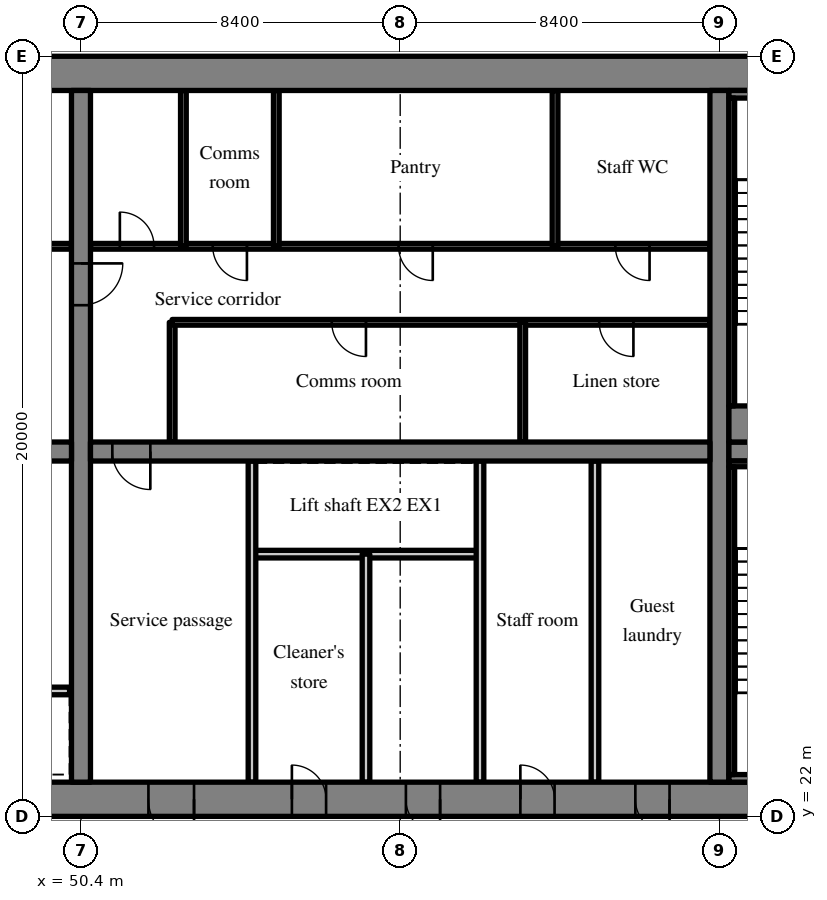
"""IFC4 building model, lengths in metres.
Left out: names, types, materials, properties, quantities, classifications, styles, units other than length and angle.
Written with IfcOpenShell. Run it as: python <this file> out.ifc"""

import sys

from ifc_helpers import new_model, si_unit, direction, frame, frame_2d, origin, place, context, subcontext, project, spatial, rectangle, extrude, source, transform, mapped, element, fill, save


model = new_model("IFC4")
c1 = context("Model", 3, precision=1e-05, world=origin(), true_north=direction((0.0, 1.0)))
c2 = subcontext(c1, "Body", "Model", "MODEL_VIEW")
j1 = project(units=[si_unit("LENGTHUNIT", "METRE"), si_unit("PLANEANGLEUNIT", "RADIAN")], contexts=[c1])
p1 = place(None, origin())
s1 = spatial("IfcSite", under=j1, at=p1, CompositionType="ELEMENT")
p2 = place(p1, origin())
s2 = spatial("IfcBuilding", under=s1, at=p2, CompositionType="ELEMENT")
p3 = place(p2, frame((0.0, 0.0, 118.0)))
s3 = spatial("IfcBuildingStorey", under=s2, at=p3, CompositionType="ELEMENT", Elevation=118.0)
m1 = source(origin(), c2, "Body", "SweptSolid", [
    extrude(rectangle(XDim=50.4, YDim=0.9, at=frame_2d((25.2, 0.0))), origin(), (0.0, 0.0, 1.0), 3.52),
])
p4 = place(p3, frame((25.2, 22.45, 0.0), z_axis=(0.0, 0.0, 1.0), x_axis=(1.0, 0.0, 0.0)))
e1 = element("IfcWall", 1, at=p4, inside=s3, PredefinedType="SHEAR", context=c2, shape_type="MappedRepresentation", body=[
    mapped(m1, transform((0.0, 0.0, 0.0), scale=1.0)),
])
m2 = source(origin(), c2, "Body", "SweptSolid", [
    extrude(rectangle(XDim=1.8, YDim=2.1, at=frame_2d((0.9, 1.05))), frame((0.0, 0.46, 0.0), z_axis=(0.0, -1.0, 0.0), x_axis=(1.0, 0.0, 0.0)), (0.0, 0.0, 1.0), 0.92),
])
p5 = place(p4, frame((15.9, 0.0, 0.0)))
e2 = element("IfcOpeningElement", 2, at=p5, cuts=e1, PredefinedType="OPENING", context=c2, shape_type="MappedRepresentation", body=[
    mapped(m2, transform((0.0, 0.0, 0.0), scale=1.0)),
])
m3 = source(origin(), c2, "Body", "SweptSolid", [
    extrude(rectangle(XDim=1.2, YDim=2.1, at=frame_2d((0.6, 1.05))), frame((0.0, 0.46, 0.0), z_axis=(0.0, -1.0, 0.0), x_axis=(1.0, 0.0, 0.0)), (0.0, 0.0, 1.0), 0.92),
])
p6 = place(p4, frame((26.975, 0.0, 0.0)))
e3 = element("IfcOpeningElement", 3, at=p6, cuts=e1, PredefinedType="OPENING", context=c2, shape_type="MappedRepresentation", body=[
    mapped(m3, transform((0.0, 0.0, 0.0), scale=1.0)),
])
m4 = source(origin(), c2, "Body", "SweptSolid", [
    extrude(rectangle(XDim=0.9, YDim=2.1, at=frame_2d((0.45, 1.05))), frame((0.0, 0.46, 0.0), z_axis=(0.0, -1.0, 0.0), x_axis=(1.0, 0.0, 0.0)), (0.0, 0.0, 1.0), 0.92),
])
p7 = place(p4, frame((33.75, 0.0, 0.0)))
e4 = element("IfcOpeningElement", 4, at=p7, cuts=e1, PredefinedType="OPENING", context=c2, shape_type="MappedRepresentation", body=[
    mapped(m4, transform((0.0, 0.0, 0.0), scale=1.0)),
])
p8 = place(p4, frame((30.75, 0.0, 0.0)))
e5 = element("IfcOpeningElement", 5, at=p8, cuts=e1, PredefinedType="OPENING", context=c2, shape_type="MappedRepresentation", body=[
    mapped(m4, transform((0.0, 0.0, 0.0), scale=1.0)),
])
p9 = place(p4, frame((39.788, 0.0, 0.0)))
e6 = element("IfcOpeningElement", 6, at=p9, cuts=e1, PredefinedType="OPENING", context=c2, shape_type="MappedRepresentation", body=[
    mapped(m4, transform((0.0, 0.0, 0.0), scale=1.0)),
])
p10 = place(p4, frame((36.762, 0.0, 0.0)))
e7 = element("IfcOpeningElement", 7, at=p10, cuts=e1, PredefinedType="OPENING", context=c2, shape_type="MappedRepresentation", body=[
    mapped(m4, transform((0.0, 0.0, 0.0), scale=1.0)),
])
p11 = place(p4, frame((6.45, 0.0, 0.0)))
e8 = element("IfcOpeningElement", 8, at=p11, cuts=e1, PredefinedType="OPENING", context=c2, shape_type="MappedRepresentation", body=[
    mapped(m3, transform((0.0, 0.0, 0.0), scale=1.0)),
])
p12 = place(p4, frame((47.775, 0.0, 0.0)))
e9 = element("IfcOpeningElement", 9, at=p12, cuts=e1, PredefinedType="OPENING", context=c2, shape_type="MappedRepresentation", body=[
    mapped(m3, transform((0.0, 0.0, 0.0), scale=1.0)),
])
p13 = place(p3, frame((25.2, 41.55, 0.0), z_axis=(0.0, 0.0, 1.0), x_axis=(1.0, 0.0, 0.0)))
e10 = element("IfcWall", 10, at=p13, inside=s3, PredefinedType="SHEAR", context=c2, shape_type="MappedRepresentation", body=[
    mapped(m1, transform((0.0, 0.0, 0.0), scale=1.0)),
])
m5 = source(origin(), c2, "Body", "SweptSolid", [
    extrude(rectangle(XDim=18.2, YDim=0.5, at=frame_2d((9.1, 0.0))), origin(), (0.0, 0.0, 1.0), 3.52),
])
p14 = place(p3, frame((50.4, 22.9, 0.0), z_axis=(0.0, 0.0, 1.0), x_axis=(0.0, 1.0, 0.0)))
e11 = element("IfcWall", 11, at=p14, inside=s3, PredefinedType="SHEAR", context=c2, shape_type="MappedRepresentation", body=[
    mapped(m5, transform((0.0, 0.0, 0.0), scale=1.0)),
])
m6 = source(origin(), c2, "Body", "SweptSolid", [
    extrude(rectangle(XDim=1.1, YDim=2.1, at=frame_2d((0.55, 1.05))), frame((0.0, 0.26, 0.0), z_axis=(0.0, -1.0, 0.0), x_axis=(1.0, 0.0, 0.0)), (0.0, 0.0, 1.0), 0.52),
])
p15 = place(p14, frame((12.55, 0.0, 0.0)))
e12 = element("IfcOpeningElement", 12, at=p15, cuts=e11, PredefinedType="OPENING", context=c2, shape_type="MappedRepresentation", body=[
    mapped(m6, transform((0.0, 0.0, 0.0), scale=1.0)),
])
p16 = place(p3, frame((67.2, 22.9, 0.0), z_axis=(0.0, 0.0, 1.0), x_axis=(0.0, 1.0, 0.0)))
e13 = element("IfcWall", 13, at=p16, inside=s3, PredefinedType="SHEAR", context=c2, shape_type="MappedRepresentation", body=[
    mapped(m5, transform((0.0, 0.0, 0.0), scale=1.0)),
])
m7 = source(origin(), c2, "Body", "SweptSolid", [
    extrude(rectangle(XDim=16.3, YDim=0.5, at=frame_2d((8.15, 0.0))), origin(), (0.0, 0.0, 1.0), 3.52),
])
p17 = place(p3, frame((33.85, 31.6, 0.0), z_axis=(0.0, 0.0, 1.0), x_axis=(1.0, 0.0, 0.0)))
e14 = element("IfcWall", 14, at=p17, inside=s3, PredefinedType="SHEAR", context=c2, shape_type="MappedRepresentation", body=[
    mapped(m7, transform((0.0, 0.0, 0.0), scale=1.0)),
])
m8 = source(origin(), c2, "Body", "SweptSolid", [
    extrude(rectangle(XDim=1.0, YDim=2.1, at=frame_2d((0.5, 1.05))), frame((0.0, 0.26, 0.0), z_axis=(0.0, -1.0, 0.0), x_axis=(1.0, 0.0, 0.0)), (0.0, 0.0, 1.0), 0.52),
])
p18 = place(p17, frame((14.725, 0.0, 0.0)))
e15 = element("IfcOpeningElement", 15, at=p18, cuts=e14, PredefinedType="OPENING", context=c2, shape_type="MappedRepresentation", body=[
    mapped(m8, transform((0.0, 0.0, 0.0), scale=1.0)),
])
m9 = source(origin(), c2, "Body", "SweptSolid", [
    extrude(rectangle(XDim=16.3, YDim=0.5, at=frame_2d((8.15, 0.0))), origin(), (0.0, 0.0, 1.0), 3.52),
])
p19 = place(p3, frame((50.65, 31.6, 0.0), z_axis=(0.0, 0.0, 1.0), x_axis=(1.0, 0.0, 0.0)))
e16 = element("IfcWall", 16, at=p19, inside=s3, PredefinedType="SHEAR", context=c2, shape_type="MappedRepresentation", body=[
    mapped(m9, transform((0.0, 0.0, 0.0), scale=1.0)),
])
p20 = place(p19, frame((0.575, 0.0, 0.0)))
e17 = element("IfcOpeningElement", 17, at=p20, cuts=e16, PredefinedType="OPENING", context=c2, shape_type="MappedRepresentation", body=[
    mapped(m8, transform((0.0, 0.0, 0.0), scale=1.0)),
])
m10 = source(origin(), c2, "Body", "SweptSolid", [
    extrude(rectangle(XDim=7.25, YDim=0.5, at=frame_2d((3.625, 0.0))), origin(), (0.0, 0.0, 1.0), 3.52),
])
p21 = place(p3, frame((67.45, 31.6, 0.0), z_axis=(0.0, 0.0, 1.0), x_axis=(1.0, 0.0, 0.0)))
e18 = element("IfcWall", 18, at=p21, inside=s3, PredefinedType="SHEAR", context=c2, shape_type="MappedRepresentation", body=[
    mapped(m10, transform((0.0, 0.0, 0.0), scale=1.0)),
])
p22 = place(p21, frame((5.575, 0.0, 0.0)))
e19 = element("IfcOpeningElement", 19, at=p22, cuts=e18, PredefinedType="OPENING", context=c2, shape_type="MappedRepresentation", body=[
    mapped(m6, transform((0.0, 0.0, 0.0), scale=1.0)),
])
m11 = source(origin(), c2, "Body", "SweptSolid", [
    extrude(rectangle(XDim=6.0, YDim=0.2, at=frame_2d((3.0, 0.0))), origin(), (0.0, 0.0, 1.0), 3.52),
])
p23 = place(p3, frame((44.1, 25.3, 0.0), z_axis=(0.0, 0.0, 1.0), x_axis=(1.0, 0.0, 0.0)))
e20 = element("IfcWall", 20, at=p23, inside=s3, PredefinedType="SOLIDWALL", context=c2, shape_type="MappedRepresentation", body=[
    mapped(m11, transform((0.0, 0.0, 0.0), scale=1.0)),
])
m12 = source(origin(), c2, "Body", "SweptSolid", [
    extrude(rectangle(XDim=1.1, YDim=2.1, at=frame_2d((0.55, 1.05))), frame((0.0, 0.11, 0.0), z_axis=(0.0, -1.0, 0.0), x_axis=(1.0, 0.0, 0.0)), (0.0, 0.0, 1.0), 0.22),
])
p24 = place(p23, frame((0.95, 0.0, 0.0)))
e21 = element("IfcOpeningElement", 21, at=p24, cuts=e20, PredefinedType="OPENING", context=c2, shape_type="MappedRepresentation", body=[
    mapped(m12, transform((0.0, 0.0, 0.0), scale=1.0)),
])
p25 = place(p23, frame((3.95, 0.0, 0.0)))
e22 = element("IfcOpeningElement", 22, at=p25, cuts=e20, PredefinedType="OPENING", context=c2, shape_type="MappedRepresentation", body=[
    mapped(m12, transform((0.0, 0.0, 0.0), scale=1.0)),
])
m13 = source(origin(), c2, "Body", "SweptSolid", [
    extrude(rectangle(XDim=16.3, YDim=0.15, at=frame_2d((8.15, 0.0))), origin(), (0.0, 0.0, 1.0), 3.52),
])
p26 = place(p3, frame((33.85, 37.0, 0.0), z_axis=(0.0, 0.0, 1.0), x_axis=(1.0, 0.0, 0.0)))
e23 = element("IfcWall", 23, at=p26, inside=s3, PredefinedType="PARTITIONING", context=c2, shape_type="MappedRepresentation", body=[
    mapped(m13, transform((0.0, 0.0, 0.0), scale=1.0)),
])
m14 = source(origin(), c2, "Body", "SweptSolid", [
    extrude(rectangle(XDim=0.9, YDim=2.1, at=frame_2d((0.45, 1.05))), frame((0.0, 0.085, 0.0), z_axis=(0.0, -1.0, 0.0), x_axis=(1.0, 0.0, 0.0)), (0.0, 0.0, 1.0), 0.17),
])
p27 = place(p26, frame((6.478, 0.0, 0.0)))
e24 = element("IfcOpeningElement", 24, at=p27, cuts=e23, PredefinedType="OPENING", context=c2, shape_type="MappedRepresentation", body=[
    mapped(m14, transform((0.0, 0.0, 0.0), scale=1.0)),
])
p28 = place(p26, frame((14.627, 0.0, 0.0)))
e25 = element("IfcOpeningElement", 25, at=p28, cuts=e23, PredefinedType="OPENING", context=c2, shape_type="MappedRepresentation", body=[
    mapped(m14, transform((0.0, 0.0, 0.0), scale=1.0)),
])
p29 = place(p3, frame((60.9, 28.9, 0.0), z_axis=(0.0, 0.0, 1.0), x_axis=(-1.0, 0.0, 0.0)))
e26 = element("IfcWall", 26, at=p29, inside=s3, PredefinedType="SOLIDWALL", context=c2, shape_type="MappedRepresentation", body=[
    mapped(m11, transform((0.0, 0.0, 0.0), scale=1.0)),
])
m15 = source(origin(), c2, "Body", "SweptSolid", [
    extrude(rectangle(XDim=8.45, YDim=0.2, at=frame_2d((4.225, 0.0))), origin(), (0.0, 0.0, 1.0), 3.52),
])
for number, where, z_axis, x_axis in (
    (27, (54.9, 22.9, 0.0), (0.0, 0.0, 1.0), (0.0, 1.0, 0.0)),
    (28, (60.9, 22.9, 0.0), (0.0, 0.0, 1.0), (0.0, 1.0, 0.0)),
):
    element("IfcWall", number, at=place(p3, frame(where, z_axis=z_axis, x_axis=x_axis)), inside=s3, PredefinedType="PARTITIONING", context=c2, shape_type="MappedRepresentation", body=[
        mapped(m15, transform((0.0, 0.0, 0.0), scale=1.0)),
    ])
p30 = place(p3, frame((57.9, 22.9, 0.0), z_axis=(0.0, 0.0, 1.0), x_axis=(0.0, 1.0, 0.0)))
e29 = element("IfcWall", 29, at=p30, inside=s3, PredefinedType="PARTITIONING", context=c2, shape_type="MappedRepresentation", body=[
    mapped(m11, transform((0.0, 0.0, 0.0), scale=1.0)),
])
p31 = place(p3, frame((63.925, 22.9, 0.0), z_axis=(0.0, 0.0, 1.0), x_axis=(0.0, 1.0, 0.0)))
e30 = element("IfcWall", 30, at=p31, inside=s3, PredefinedType="PARTITIONING", context=c2, shape_type="MappedRepresentation", body=[
    mapped(m15, transform((0.0, 0.0, 0.0), scale=1.0)),
])
m16 = source(origin(), c2, "Body", "SweptSolid", [
    extrude(rectangle(XDim=3.15, YDim=0.15, at=frame_2d((1.575, 0.0))), origin(), (0.0, 0.0, 1.0), 3.52),
])
p32 = place(p3, frame((52.8, 31.85, 0.0), z_axis=(0.0, 0.0, 1.0), x_axis=(0.0, 1.0, 0.0)))
e31 = element("IfcWall", 31, at=p32, inside=s3, PredefinedType="PARTITIONING", context=c2, shape_type="MappedRepresentation", body=[
    mapped(m16, transform((0.0, 0.0, 0.0), scale=1.0)),
])
m17 = source(origin(), c2, "Body", "SweptSolid", [
    extrude(rectangle(XDim=14.15, YDim=0.15, at=frame_2d((7.075, 0.0))), origin(), (0.0, 0.0, 1.0), 3.52),
])
p33 = place(p3, frame((66.95, 35.0, 0.0), z_axis=(0.0, 0.0, 1.0), x_axis=(-1.0, 0.0, 0.0)))
e32 = element("IfcWall", 32, at=p33, inside=s3, PredefinedType="PARTITIONING", context=c2, shape_type="MappedRepresentation", body=[
    mapped(m17, transform((0.0, 0.0, 0.0), scale=1.0)),
])
p34 = place(p33, frame((2.013, 0.0, 0.0)))
e33 = element("IfcOpeningElement", 33, at=p34, cuts=e32, PredefinedType="OPENING", context=c2, shape_type="MappedRepresentation", body=[
    mapped(m14, transform((0.0, 0.0, 0.0), scale=1.0)),
])
p35 = place(p33, frame((9.051, 0.0, 0.0)))
e34 = element("IfcOpeningElement", 34, at=p35, cuts=e32, PredefinedType="OPENING", context=c2, shape_type="MappedRepresentation", body=[
    mapped(m14, transform((0.0, 0.0, 0.0), scale=1.0)),
])
m18 = source(origin(), c2, "Body", "SweptSolid", [
    extrude(rectangle(XDim=16.3, YDim=0.15, at=frame_2d((8.15, 0.0))), origin(), (0.0, 0.0, 1.0), 3.52),
])
p36 = place(p3, frame((66.95, 37.0, 0.0), z_axis=(0.0, 0.0, 1.0), x_axis=(-1.0, 0.0, 0.0)))
e35 = element("IfcWall", 35, at=p36, inside=s3, PredefinedType="PARTITIONING", context=c2, shape_type="MappedRepresentation", body=[
    mapped(m18, transform((0.0, 0.0, 0.0), scale=1.0)),
])
p37 = place(p36, frame((1.588, 0.0, 0.0)))
e36 = element("IfcOpeningElement", 36, at=p37, cuts=e35, PredefinedType="OPENING", context=c2, shape_type="MappedRepresentation", body=[
    mapped(m14, transform((0.0, 0.0, 0.0), scale=1.0)),
])
p38 = place(p36, frame((7.293, 0.0, 0.0)))
e37 = element("IfcOpeningElement", 37, at=p38, cuts=e35, PredefinedType="OPENING", context=c2, shape_type="MappedRepresentation", body=[
    mapped(m14, transform((0.0, 0.0, 0.0), scale=1.0)),
])
p39 = place(p36, frame((12.183, 0.0, 0.0)))
e38 = element("IfcOpeningElement", 38, at=p39, cuts=e35, PredefinedType="OPENING", context=c2, shape_type="MappedRepresentation", body=[
    mapped(m14, transform((0.0, 0.0, 0.0), scale=1.0)),
])
p40 = place(p36, frame((14.627, 0.0, 0.0)))
e39 = element("IfcOpeningElement", 39, at=p40, cuts=e35, PredefinedType="OPENING", context=c2, shape_type="MappedRepresentation", body=[
    mapped(m14, transform((0.0, 0.0, 0.0), scale=1.0)),
])
p41 = place(p3, frame((62.024, 31.85, 0.0), z_axis=(0.0, 0.0, 1.0), x_axis=(0.0, 1.0, 0.0)))
e40 = element("IfcWall", 40, at=p41, inside=s3, PredefinedType="PARTITIONING", context=c2, shape_type="MappedRepresentation", body=[
    mapped(m16, transform((0.0, 0.0, 0.0), scale=1.0)),
])
m19 = source(origin(), c2, "Body", "SweptSolid", [
    extrude(rectangle(XDim=4.1, YDim=0.15, at=frame_2d((2.05, 0.0))), origin(), (0.0, 0.0, 1.0), 3.52),
])
for number, where, z_axis, x_axis in (
    (41, (62.875, 37.0, 0.0), (0.0, 0.0, 1.0), (0.0, 1.0, 0.0)),
    (42, (55.54, 37.0, 0.0), (0.0, 0.0, 1.0), (0.0, 1.0, 0.0)),
    (43, (53.095, 37.0, 0.0), (0.0, 0.0, 1.0), (0.0, 1.0, 0.0)),
):
    element("IfcWall", number, at=place(p3, frame(where, z_axis=z_axis, x_axis=x_axis)), inside=s3, PredefinedType="PARTITIONING", context=c2, shape_type="MappedRepresentation", body=[
        mapped(m19, transform((0.0, 0.0, 0.0), scale=1.0)),
    ])
m20 = source(origin(), c2, "Body", "SweptSolid", [
    extrude(rectangle(XDim=4.8, YDim=0.2, at=frame_2d((2.4, 0.0))), origin(), (0.0, 0.0, 1.0), 3.52),
])
p42 = place(p3, frame((67.45, 23.0, 0.0), z_axis=(0.0, 0.0, 1.0), x_axis=(1.0, 0.0, 0.0)))
e44 = element("IfcWall", 44, at=p42, inside=s3, PredefinedType="SOLIDWALL", context=c2, shape_type="MappedRepresentation", body=[
    mapped(m20, transform((0.0, 0.0, 0.0), scale=1.0)),
])
m21 = source(origin(), c2, "Body", "SweptSolid", [
    extrude(rectangle(XDim=4.8, YDim=0.15, at=frame_2d((2.4, 0.0))), origin(), (0.0, 0.0, 1.0), 3.52),
])
p43 = place(p3, frame((67.45, 31.275, 0.0), z_axis=(0.0, 0.0, 1.0), x_axis=(1.0, 0.0, 0.0)))
e45 = element("IfcWall", 45, at=p43, inside=s3, PredefinedType="SOLIDWALL", context=c2, shape_type="MappedRepresentation", body=[
    mapped(m21, transform((0.0, 0.0, 0.0), scale=1.0)),
])
m22 = source(origin(), c2, "Body", "SweptSolid", [
    extrude(rectangle(XDim=8.1, YDim=0.15, at=frame_2d((4.05, 0.0))), origin(), (0.0, 0.0, 1.0), 3.52),
])
p44 = place(p3, frame((67.525, 23.1, 0.0), z_axis=(0.0, 0.0, 1.0), x_axis=(0.0, 1.0, 0.0)))
e46 = element("IfcWall", 46, at=p44, inside=s3, PredefinedType="SOLIDWALL", context=c2, shape_type="MappedRepresentation", body=[
    mapped(m22, transform((0.0, 0.0, 0.0), scale=1.0)),
])
p45 = place(p3, frame((67.45, 41.0, 0.0), z_axis=(0.0, 0.0, 1.0), x_axis=(1.0, 0.0, 0.0)))
e47 = element("IfcWall", 47, at=p45, inside=s3, PredefinedType="SOLIDWALL", context=c2, shape_type="MappedRepresentation", body=[
    mapped(m20, transform((0.0, 0.0, 0.0), scale=1.0)),
])
m23 = source(origin(), c2, "Body", "SweptSolid", [
    extrude(rectangle(XDim=4.8, YDim=0.95, at=frame_2d((2.4, 0.0))), origin(), (0.0, 0.0, 1.0), 3.52),
])
p46 = place(p3, frame((67.45, 32.325, 0.0), z_axis=(0.0, 0.0, 1.0), x_axis=(1.0, 0.0, 0.0)))
e48 = element("IfcWall", 48, at=p46, inside=s3, PredefinedType="SOLIDWALL", context=c2, shape_type="MappedRepresentation", body=[
    mapped(m23, transform((0.0, 0.0, 0.0), scale=1.0)),
])
p47 = place(p3, frame((67.525, 32.8, 0.0), z_axis=(0.0, 0.0, 1.0), x_axis=(0.0, 1.0, 0.0)))
e49 = element("IfcWall", 49, at=p47, inside=s3, PredefinedType="SOLIDWALL", context=c2, shape_type="MappedRepresentation", body=[
    mapped(m22, transform((0.0, 0.0, 0.0), scale=1.0)),
])
m24 = source(origin(), c2, "Body", "SweptSolid", [
    extrude(rectangle(XDim=1.2, YDim=2.1, at=frame_2d((0.6, 1.05))), frame((0.0, 0.375, 0.0), z_axis=(0.0, -1.0, 0.0), x_axis=(1.0, 0.0, 0.0)), (0.0, 0.0, 1.0), 0.05),
])
p48 = place(p6, origin())
e50 = element("IfcDoor", 50, at=p48, inside=s3, OperationType="SINGLE_SWING_RIGHT", PredefinedType="DOOR", context=c2, shape_type="MappedRepresentation", body=[
    mapped(m24, transform((0.0, 0.0, 0.0), scale=1.0)),
])
fill(e3, e50)
m25 = source(origin(), c2, "Body", "SweptSolid", [
    extrude(rectangle(XDim=1.0, YDim=2.1, at=frame_2d((0.5, 1.05))), frame((0.0, 0.025, 0.0), z_axis=(0.0, -1.0, 0.0), x_axis=(1.0, 0.0, 0.0)), (0.0, 0.0, 1.0), 0.05),
])
p49 = place(p20, origin())
e51 = element("IfcDoor", 51, at=p49, inside=s3, OperationType="SINGLE_SWING_RIGHT", PredefinedType="DOOR", context=c2, shape_type="MappedRepresentation", body=[
    mapped(m25, transform((0.0, 0.0, 0.0), scale=1.0)),
])
fill(e17, e51)
m26 = source(origin(), c2, "Body", "SweptSolid", [
    extrude(rectangle(XDim=0.9, YDim=2.1, at=frame_2d((0.45, 1.05))), frame((0.0, 0.375, 0.0), z_axis=(0.0, -1.0, 0.0), x_axis=(1.0, 0.0, 0.0)), (0.0, 0.0, 1.0), 0.05),
])
p50 = place(p7, origin())
e52 = element("IfcDoor", 52, at=p50, inside=s3, OperationType="SINGLE_SWING_RIGHT", PredefinedType="DOOR", context=c2, shape_type="MappedRepresentation", body=[
    mapped(m26, transform((0.0, 0.0, 0.0), scale=1.0)),
])
fill(e4, e52)
p51 = place(p8, origin())
e53 = element("IfcDoor", 53, at=p51, inside=s3, OperationType="SINGLE_SWING_LEFT", PredefinedType="DOOR", context=c2, shape_type="MappedRepresentation", body=[
    mapped(m26, transform((0.0, 0.0, 0.0), scale=1.0)),
])
fill(e5, e53)
p52 = place(p9, origin())
e54 = element("IfcDoor", 54, at=p52, inside=s3, OperationType="SINGLE_SWING_RIGHT", PredefinedType="DOOR", context=c2, shape_type="MappedRepresentation", body=[
    mapped(m26, transform((0.0, 0.0, 0.0), scale=1.0)),
])
fill(e6, e54)
p53 = place(p10, origin())
e55 = element("IfcDoor", 55, at=p53, inside=s3, OperationType="SINGLE_SWING_LEFT", PredefinedType="DOOR", context=c2, shape_type="MappedRepresentation", body=[
    mapped(m26, transform((0.0, 0.0, 0.0), scale=1.0)),
])
fill(e7, e55)
m27 = source(origin(), c2, "Body", "SweptSolid", [
    extrude(rectangle(XDim=0.9, YDim=2.1, at=frame_2d((0.45, 1.05))), frame((0.0, 0.025, 0.0), z_axis=(0.0, -1.0, 0.0), x_axis=(1.0, 0.0, 0.0)), (0.0, 0.0, 1.0), 0.05),
])
p54 = place(p34, origin())
e56 = element("IfcDoor", 56, at=p54, inside=s3, OperationType="SINGLE_SWING_LEFT", PredefinedType="DOOR", context=c2, shape_type="MappedRepresentation", body=[
    mapped(m27, transform((0.0, 0.0, 0.0), scale=1.0)),
])
fill(e33, e56)
p55 = place(p35, origin())
e57 = element("IfcDoor", 57, at=p55, inside=s3, OperationType="SINGLE_SWING_LEFT", PredefinedType="DOOR", context=c2, shape_type="MappedRepresentation", body=[
    mapped(m27, transform((0.0, 0.0, 0.0), scale=1.0)),
])
fill(e34, e57)
p56 = place(p37, origin())
e58 = element("IfcDoor", 58, at=p56, inside=s3, OperationType="SINGLE_SWING_LEFT", PredefinedType="DOOR", context=c2, shape_type="MappedRepresentation", body=[
    mapped(m27, transform((0.0, 0.0, 0.0), scale=1.0)),
])
fill(e36, e58)
p57 = place(p38, origin())
e59 = element("IfcDoor", 59, at=p57, inside=s3, OperationType="SINGLE_SWING_LEFT", PredefinedType="DOOR", context=c2, shape_type="MappedRepresentation", body=[
    mapped(m27, transform((0.0, 0.0, 0.0), scale=1.0)),
])
fill(e37, e59)
p58 = place(p39, origin())
e60 = element("IfcDoor", 60, at=p58, inside=s3, OperationType="SINGLE_SWING_LEFT", PredefinedType="DOOR", context=c2, shape_type="MappedRepresentation", body=[
    mapped(m27, transform((0.0, 0.0, 0.0), scale=1.0)),
])
fill(e38, e60)
p59 = place(p40, origin())
e61 = element("IfcDoor", 61, at=p59, inside=s3, OperationType="SINGLE_SWING_RIGHT", PredefinedType="DOOR", context=c2, shape_type="MappedRepresentation", body=[
    mapped(m27, transform((0.0, 0.0, 0.0), scale=1.0)),
])
fill(e39, e61)
m28 = source(origin(), c2, "Body", "SweptSolid", [
    extrude(rectangle(XDim=1.1, YDim=2.1, at=frame_2d((0.55, 1.05))), frame((0.0, 0.025, 0.0), z_axis=(0.0, -1.0, 0.0), x_axis=(1.0, 0.0, 0.0)), (0.0, 0.0, 1.0), 0.05),
])
p60 = place(p15, origin())
e62 = element("IfcDoor", 62, at=p60, inside=s3, OperationType="SINGLE_SWING_RIGHT", PredefinedType="DOOR", context=c2, shape_type="MappedRepresentation", body=[
    mapped(m28, transform((0.0, 0.0, 0.0), scale=1.0)),
])
fill(e12, e62)
save(model, sys.argv[1])
